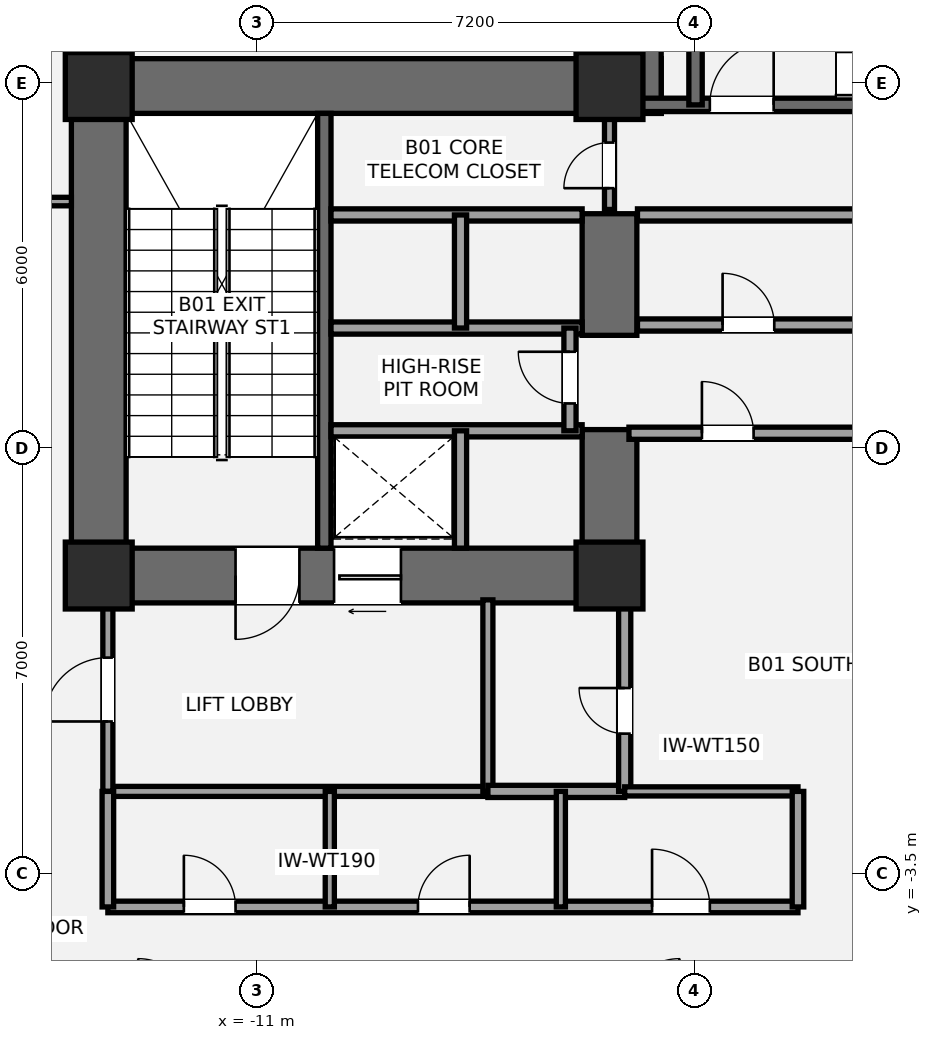
"""IFC4 building model, lengths in metres.
Left out: names, types, materials, properties, quantities, classifications, styles, units other than length and angle.
Written with IfcOpenShell. Run it as: python <this file> out.ifc"""

import sys

from ifc_helpers import new_model, si_unit, direction, frame, frame_2d, origin, origin_2d, place, context, subcontext, project, spatial, rectangle, extrude, element, fill, save


model = new_model("IFC4")
c1 = context("Model", 3, precision=1e-05, world=origin(), true_north=direction((0.0, 1.0)))
c2 = subcontext(c1, "Body", "Model", "MODEL_VIEW")
j1 = project(units=[si_unit("LENGTHUNIT", "METRE"), si_unit("PLANEANGLEUNIT", "RADIAN")], contexts=[c1])
p1 = place(None, origin())
s1 = spatial("IfcSite", under=j1, at=p1, CompositionType="ELEMENT")
p2 = place(p1, origin())
s2 = spatial("IfcBuilding", under=s1, at=p2, CompositionType="ELEMENT")
p3 = place(p2, frame((0.0, 0.0, -4.4)))
s3 = spatial("IfcBuildingStorey", under=s2, at=p3, CompositionType="ELEMENT", Elevation=-4.4)
p4 = place(p3, frame((-13.6, 0.95, 0.0), z_axis=(0.0, 0.0, 1.0), x_axis=(0.0, 1.0, 0.0)))
e1 = element("IfcWall", 1, at=p4, inside=s3, PredefinedType="SHEAR", context=c2, shape_type="SweptSolid", body=[
    extrude(rectangle(XDim=8.95, YDim=0.9, at=frame_2d((4.475, 0.0))), origin(), (0.0, 0.0, 1.0), 4.4),
])
p5 = place(p3, frame((-14.05, 9.45, 0.0), z_axis=(0.0, 0.0, 1.0), x_axis=(1.0, 0.0, 0.0)))
e2 = element("IfcWall", 2, at=p5, inside=s3, PredefinedType="SHEAR", context=c2, shape_type="SweptSolid", body=[
    extrude(rectangle(XDim=9.7, YDim=0.9, at=frame_2d((4.85, 0.0))), origin(), (0.0, 0.0, 1.0), 4.4),
])
p6 = place(p3, frame((-4.75, 1.4, 0.0), z_axis=(0.0, 0.0, 1.0), x_axis=(-1.0, 0.0, 0.0)))
e3 = element("IfcWall", 3, at=p6, inside=s3, PredefinedType="SHEAR", context=c2, shape_type="SweptSolid", body=[
    extrude(rectangle(XDim=9.3, YDim=0.9, at=frame_2d((4.65, 0.0))), origin(), (0.0, 0.0, 1.0), 4.4),
])
p7 = place(p6, frame((5.55, 0.0, 0.0)))
e4 = element("IfcOpeningElement", 4, at=p7, cuts=e3, PredefinedType="OPENING", context=c2, shape_type="SweptSolid", body=[
    extrude(rectangle(XDim=1.05, YDim=2.15, at=frame_2d((0.525, 1.075))), frame((0.0, 0.46, 0.0), z_axis=(0.0, -1.0, 0.0), x_axis=(1.0, 0.0, 0.0)), (0.0, 0.0, 1.0), 0.92),
])
p8 = place(p6, frame((3.88, 0.0, 0.0)))
e5 = element("IfcOpeningElement", 5, at=p8, cuts=e3, PredefinedType="OPENING", context=c2, shape_type="SweptSolid", body=[
    extrude(rectangle(XDim=1.1, YDim=2.2, at=frame_2d((0.55, 1.1))), frame((0.0, 0.46, 0.0), z_axis=(0.0, -1.0, 0.0), x_axis=(1.0, 0.0, 0.0)), (0.0, 0.0, 1.0), 0.92),
])
p9 = place(p3, frame((-5.2, 0.95, 0.0), z_axis=(0.0, 0.0, 1.0), x_axis=(0.0, 1.0, 0.0)))
e6 = element("IfcWall", 6, at=p9, inside=s3, PredefinedType="SHEAR", context=c2, shape_type="SweptSolid", body=[
    extrude(rectangle(XDim=2.85, YDim=0.9, at=frame_2d((1.425, 0.0))), origin(), (0.0, 0.0, 1.0), 4.4),
])
p10 = place(p3, frame((-5.2, 5.35, 0.0), z_axis=(0.0, 0.0, 1.0), x_axis=(0.0, 1.0, 0.0)))
e7 = element("IfcWall", 7, at=p10, inside=s3, PredefinedType="SHEAR", context=c2, shape_type="SweptSolid", body=[
    extrude(rectangle(XDim=2.0, YDim=0.9, at=frame_2d((1.0, 0.0))), origin(), (0.0, 0.0, 1.0), 4.4),
])
p11 = place(p3, frame((-9.89, 1.85, 0.0), z_axis=(0.0, 0.0, 1.0), x_axis=(0.0, 1.0, 0.0)))
e8 = element("IfcWall", 8, at=p11, inside=s3, PredefinedType="SHEAR", context=c2, shape_type="SweptSolid", body=[
    extrude(rectangle(XDim=7.15, YDim=0.22, at=frame_2d((3.575, 0.0))), origin(), (0.0, 0.0, 1.0), 4.4),
])
p12 = place(p3, frame((-4.8, 9.0, 0.0), z_axis=(0.0, 0.0, 1.0), x_axis=(0.0, 1.0, 0.0)))
e9 = element("IfcWall", 9, at=p12, inside=s3, PredefinedType="SHEAR", context=c2, shape_type="SweptSolid", body=[
    extrude(rectangle(XDim=4.3, YDim=0.9, at=frame_2d((2.15, 0.0))), origin(), (0.0, 0.0, 1.0), 4.4),
])
p13 = place(p3, frame((-4.7, 9.14, 0.0), z_axis=(0.0, 0.0, 1.0), x_axis=(1.0, 0.0, 0.0)))
e10 = element("IfcWall", 10, at=p13, inside=s3, PredefinedType="SHEAR", context=c2, shape_type="SweptSolid", body=[
    extrude(rectangle(XDim=9.3, YDim=0.22, at=frame_2d((4.65, 0.0))), origin(), (0.0, 0.0, 1.0), 4.4),
])
p14 = place(p13, frame((1.15, 0.0, 0.0)))
e11 = element("IfcOpeningElement", 11, at=p14, cuts=e10, PredefinedType="OPENING", context=c2, shape_type="SweptSolid", body=[
    extrude(rectangle(XDim=1.05, YDim=2.15, at=frame_2d((0.525, 1.075))), frame((0.0, 0.12, 0.0), z_axis=(0.0, -1.0, 0.0), x_axis=(1.0, 0.0, 0.0)), (0.0, 0.0, 1.0), 0.24),
])
p15 = place(p3, frame((-3.785, 9.14, 0.0), z_axis=(0.0, 0.0, 1.0), x_axis=(0.0, 1.0, 0.0)))
e12 = element("IfcWall", 12, at=p15, inside=s3, PredefinedType="SHEAR", context=c2, shape_type="SweptSolid", body=[
    extrude(rectangle(XDim=3.26, YDim=0.22, at=frame_2d((1.63, 0.0))), origin(), (0.0, 0.0, 1.0), 4.4),
])
for number, where, z_axis, x_axis in (
    (13, (-13.6, 1.4, 0.0), (0.0, 0.0, 1.0), (1.0, 0.0, 0.0)),
    (14, (-13.6, 9.45, 0.0), (0.0, 0.0, 1.0), (1.0, 0.0, 0.0)),
    (15, (-5.2, 1.4, 0.0), (0.0, 0.0, 1.0), (1.0, 0.0, 0.0)),
    (16, (-5.2, 9.45, 0.0), (0.0, 0.0, 1.0), (1.0, 0.0, 0.0)),
):
    element("IfcColumn", number, at=place(p3, frame(where, z_axis=z_axis, x_axis=x_axis)), inside=s3, PredefinedType="COLUMN", context=c2, shape_type="SweptSolid", body=[
        extrude(rectangle(XDim=1.1, YDim=1.1, at=origin_2d()), origin(), (0.0, 0.0, 1.0), 4.4),
    ])
p16 = place(p3, frame((-13.45, -2.15, 0.0), z_axis=(0.0, 0.0, 1.0), x_axis=(1.0, 0.0, 0.0)))
e17 = element("IfcWall", 17, at=p16, inside=s3, PredefinedType="PARTITIONING", context=c2, shape_type="SweptSolid", body=[
    extrude(rectangle(XDim=6.25, YDim=0.165, at=frame_2d((3.125, 0.0))), origin(), (0.0, 0.0, 1.0), 4.14),
])
p17 = place(p3, frame((-13.45, -2.15, 0.0), z_axis=(0.0, 0.0, 1.0), x_axis=(0.0, 1.0, 0.0)))
e18 = element("IfcWall", 18, at=p17, inside=s3, PredefinedType="PARTITIONING", context=c2, shape_type="SweptSolid", body=[
    extrude(rectangle(XDim=3.15, YDim=0.165, at=frame_2d((1.575, 0.0))), origin(), (0.0, 0.0, 1.0), 4.14),
])
p18 = place(p17, frame((1.15, 0.0, 0.0)))
e19 = element("IfcOpeningElement", 19, at=p18, cuts=e18, PredefinedType="OPENING", context=c2, shape_type="SweptSolid", body=[
    extrude(rectangle(XDim=1.05, YDim=2.15, at=frame_2d((0.525, 1.075))), frame((0.0, 0.093, 0.0), z_axis=(0.0, -1.0, 0.0), x_axis=(1.0, 0.0, 0.0)), (0.0, 0.0, 1.0), 0.185),
])
p19 = place(p3, frame((-7.2, -2.15, 0.0), z_axis=(0.0, 0.0, 1.0), x_axis=(0.0, 1.0, 0.0)))
e20 = element("IfcWall", 20, at=p19, inside=s3, PredefinedType="PARTITIONING", context=c2, shape_type="SweptSolid", body=[
    extrude(rectangle(XDim=3.15, YDim=0.165, at=frame_2d((1.575, 0.0))), origin(), (0.0, 0.0, 1.0), 4.14),
])
p20 = place(p3, frame((-7.2, -2.15, 0.0), z_axis=(0.0, 0.0, 1.0), x_axis=(1.0, 0.0, 0.0)))
e21 = element("IfcWall", 21, at=p20, inside=s3, PredefinedType="SOLIDWALL", context=c2, shape_type="SweptSolid", body=[
    extrude(rectangle(XDim=2.25, YDim=0.2, at=frame_2d((1.125, 0.0))), origin(), (0.0, 0.0, 1.0), 4.14),
])
p21 = place(p3, frame((-4.95, -2.15, 0.0), z_axis=(0.0, 0.0, 1.0), x_axis=(0.0, 1.0, 0.0)))
e22 = element("IfcWall", 22, at=p21, inside=s3, PredefinedType="SOLIDWALL", context=c2, shape_type="SweptSolid", body=[
    extrude(rectangle(XDim=3.15, YDim=0.2, at=frame_2d((1.575, 0.0))), origin(), (0.0, 0.0, 1.0), 3.508),
])
p22 = place(p21, frame((0.95, 0.0, 0.0)))
e23 = element("IfcOpeningElement", 23, at=p22, cuts=e22, PredefinedType="OPENING", context=c2, shape_type="SweptSolid", body=[
    extrude(rectangle(XDim=0.75, YDim=2.1, at=frame_2d((0.375, 1.05))), frame((0.0, 0.11, 0.0), z_axis=(0.0, -1.0, 0.0), x_axis=(1.0, 0.0, 0.0)), (0.0, 0.0, 1.0), 0.22),
])
p23 = place(p3, frame((-9.78, 3.78, 0.0), z_axis=(0.0, 0.0, 1.0), x_axis=(1.0, 0.0, 0.0)))
e24 = element("IfcWall", 24, at=p23, inside=s3, PredefinedType="SOLIDWALL", context=c2, shape_type="SweptSolid", body=[
    extrude(rectangle(XDim=4.13, YDim=0.2, at=frame_2d((2.065, 0.0))), origin(), (0.0, 0.0, 1.0), 4.14),
])
p24 = place(p3, frame((-7.65, 1.85, 0.0), z_axis=(0.0, 0.0, 1.0), x_axis=(0.0, 1.0, 0.0)))
e25 = element("IfcWall", 25, at=p24, inside=s3, PredefinedType="SOLIDWALL", context=c2, shape_type="SweptSolid", body=[
    extrude(rectangle(XDim=1.93, YDim=0.2, at=frame_2d((0.965, 0.0))), origin(), (0.0, 0.0, 1.0), 4.14),
])
for number, where, z_axis, x_axis in (
    (26, (-9.78, 5.47, 0.0), (0.0, 0.0, 1.0), (1.0, 0.0, 0.0)),
    (27, (-9.78, 7.33, 0.0), (0.0, 0.0, 1.0), (1.0, 0.0, 0.0)),
):
    element("IfcWall", number, at=place(p3, frame(where, z_axis=z_axis, x_axis=x_axis)), inside=s3, PredefinedType="SOLIDWALL", context=c2, shape_type="SweptSolid", body=[
        extrude(rectangle(XDim=4.13, YDim=0.2, at=frame_2d((2.065, 0.0))), origin(), (0.0, 0.0, 1.0), 4.14),
    ])
p25 = place(p3, frame((-7.65, 5.47, 0.0), z_axis=(0.0, 0.0, 1.0), x_axis=(0.0, 1.0, 0.0)))
e28 = element("IfcWall", 28, at=p25, inside=s3, PredefinedType="SOLIDWALL", context=c2, shape_type="SweptSolid", body=[
    extrude(rectangle(XDim=1.86, YDim=0.2, at=frame_2d((0.93, 0.0))), origin(), (0.0, 0.0, 1.0), 4.14),
])
p26 = place(p3, frame((-5.85, 3.78, 0.0), z_axis=(0.0, 0.0, 1.0), x_axis=(0.0, 1.0, 0.0)))
e29 = element("IfcWall", 29, at=p26, inside=s3, PredefinedType="SOLIDWALL", context=c2, shape_type="SweptSolid", body=[
    extrude(rectangle(XDim=1.69, YDim=0.2, at=frame_2d((0.845, 0.0))), origin(), (0.0, 0.0, 1.0), 4.14),
])
p27 = place(p26, frame((0.45, 0.0, 0.0)))
e30 = element("IfcOpeningElement", 30, at=p27, cuts=e29, PredefinedType="OPENING", context=c2, shape_type="SweptSolid", body=[
    extrude(rectangle(XDim=0.85, YDim=2.1, at=frame_2d((0.425, 1.05))), frame((0.0, 0.11, 0.0), z_axis=(0.0, -1.0, 0.0), x_axis=(1.0, 0.0, 0.0)), (0.0, 0.0, 1.0), 0.22),
])
p28 = place(p3, frame((-4.88, 3.74, 0.0), z_axis=(0.0, 0.0, 1.0), x_axis=(1.0, 0.0, 0.0)))
e31 = element("IfcWall", 31, at=p28, inside=s3, PredefinedType="SOLIDWALL", context=c2, shape_type="SweptSolid", body=[
    extrude(rectangle(XDim=4.0, YDim=0.2, at=frame_2d((2.0, 0.0))), origin(), (0.0, 0.0, 1.0), 4.14),
])
p29 = place(p28, frame((1.2, 0.0, 0.0)))
e32 = element("IfcOpeningElement", 32, at=p29, cuts=e31, PredefinedType="OPENING", context=c2, shape_type="SweptSolid", body=[
    extrude(rectangle(XDim=0.85, YDim=2.1, at=frame_2d((0.425, 1.05))), frame((0.0, 0.11, 0.0), z_axis=(0.0, -1.0, 0.0), x_axis=(1.0, 0.0, 0.0)), (0.0, 0.0, 1.0), 0.22),
])
p30 = place(p3, frame((-4.74, 5.52, 0.0), z_axis=(0.0, 0.0, 1.0), x_axis=(1.0, 0.0, 0.0)))
e33 = element("IfcWall", 33, at=p30, inside=s3, PredefinedType="SOLIDWALL", context=c2, shape_type="SweptSolid", body=[
    extrude(rectangle(XDim=3.86, YDim=0.2, at=frame_2d((1.93, 0.0))), origin(), (0.0, 0.0, 1.0), 4.14),
])
p31 = place(p30, frame((1.4, 0.0, 0.0)))
e34 = element("IfcOpeningElement", 34, at=p31, cuts=e33, PredefinedType="OPENING", context=c2, shape_type="SweptSolid", body=[
    extrude(rectangle(XDim=0.85, YDim=2.1, at=frame_2d((0.425, 1.05))), frame((0.0, 0.11, 0.0), z_axis=(0.0, -1.0, 0.0), x_axis=(1.0, 0.0, 0.0)), (0.0, 0.0, 1.0), 0.22),
])
p32 = place(p3, frame((-4.74, 7.33, 0.0), z_axis=(0.0, 0.0, 1.0), x_axis=(1.0, 0.0, 0.0)))
e35 = element("IfcWall", 35, at=p32, inside=s3, PredefinedType="SOLIDWALL", context=c2, shape_type="SweptSolid", body=[
    extrude(rectangle(XDim=3.86, YDim=0.2, at=frame_2d((1.93, 0.0))), origin(), (0.0, 0.0, 1.0), 4.14),
])
p33 = place(p3, frame((-5.2, 7.42, 0.0), z_axis=(0.0, 0.0, 1.0), x_axis=(0.0, 1.0, 0.0)))
e36 = element("IfcWall", 36, at=p33, inside=s3, PredefinedType="PARTITIONING", context=c2, shape_type="SweptSolid", body=[
    extrude(rectangle(XDim=1.58, YDim=0.165, at=frame_2d((0.79, 0.0))), origin(), (0.0, 0.0, 1.0), 4.14),
])
p34 = place(p33, frame((0.35, 0.0, 0.0)))
e37 = element("IfcOpeningElement", 37, at=p34, cuts=e36, PredefinedType="OPENING", context=c2, shape_type="SweptSolid", body=[
    extrude(rectangle(XDim=0.75, YDim=2.1, at=frame_2d((0.375, 1.05))), frame((0.0, 0.093, 0.0), z_axis=(0.0, -1.0, 0.0), x_axis=(1.0, 0.0, 0.0)), (0.0, 0.0, 1.0), 0.185),
])
p35 = place(p3, frame((-13.45, -4.05, 0.0), z_axis=(0.0, 0.0, 1.0), x_axis=(1.0, 0.0, 0.0)))
e38 = element("IfcWall", 38, at=p35, inside=s3, PredefinedType="PLUMBINGWALL", context=c2, shape_type="SweptSolid", body=[
    extrude(rectangle(XDim=11.35, YDim=0.19, at=frame_2d((5.675, 0.0))), origin(), (0.0, 0.0, 1.0), 3.667),
])
p36 = place(p35, frame((1.25, 0.0, 0.0)))
e39 = element("IfcOpeningElement", 39, at=p36, cuts=e38, PredefinedType="OPENING", context=c2, shape_type="SweptSolid", body=[
    extrude(rectangle(XDim=0.85, YDim=2.1, at=frame_2d((0.425, 1.05))), frame((0.0, 0.105, 0.0), z_axis=(0.0, -1.0, 0.0), x_axis=(1.0, 0.0, 0.0)), (0.0, 0.0, 1.0), 0.21),
])
p37 = place(p35, frame((5.1, 0.0, 0.0)))
e40 = element("IfcOpeningElement", 40, at=p37, cuts=e38, PredefinedType="OPENING", context=c2, shape_type="SweptSolid", body=[
    extrude(rectangle(XDim=0.85, YDim=2.1, at=frame_2d((0.425, 1.05))), frame((0.0, 0.105, 0.0), z_axis=(0.0, -1.0, 0.0), x_axis=(1.0, 0.0, 0.0)), (0.0, 0.0, 1.0), 0.21),
])
p38 = place(p35, frame((8.95, 0.0, 0.0)))
e41 = element("IfcOpeningElement", 41, at=p38, cuts=e38, PredefinedType="OPENING", context=c2, shape_type="SweptSolid", body=[
    extrude(rectangle(XDim=0.95, YDim=2.15, at=frame_2d((0.475, 1.075))), frame((0.0, 0.105, 0.0), z_axis=(0.0, -1.0, 0.0), x_axis=(1.0, 0.0, 0.0)), (0.0, 0.0, 1.0), 0.21),
])
p39 = place(p3, frame((-4.95, -2.15, 0.0), z_axis=(0.0, 0.0, 1.0), x_axis=(1.0, 0.0, 0.0)))
e42 = element("IfcWall", 42, at=p39, inside=s3, PredefinedType="PLUMBINGWALL", context=c2, shape_type="SweptSolid", body=[
    extrude(rectangle(XDim=2.85, YDim=0.15, at=frame_2d((1.425, 0.0))), origin(), (0.0, 0.0, 1.0), 4.14),
])
for number, where, z_axis, x_axis in (
    (43, (-13.45, -4.05, 0.0), (0.0, 0.0, 1.0), (0.0, 1.0, 0.0)),
    (44, (-2.1, -4.05, 0.0), (0.0, 0.0, 1.0), (0.0, 1.0, 0.0)),
):
    element("IfcWall", number, at=place(p3, frame(where, z_axis=z_axis, x_axis=x_axis)), inside=s3, PredefinedType="PLUMBINGWALL", context=c2, shape_type="SweptSolid", body=[
        extrude(rectangle(XDim=1.9, YDim=0.19, at=frame_2d((0.95, 0.0))), origin(), (0.0, 0.0, 1.0), 4.14),
    ])
p40 = place(p3, frame((-9.8, -4.05, 0.0), z_axis=(0.0, 0.0, 1.0), x_axis=(0.0, 1.0, 0.0)))
e45 = element("IfcWall", 45, at=p40, inside=s3, PredefinedType="PLUMBINGWALL", context=c2, shape_type="SweptSolid", body=[
    extrude(rectangle(XDim=1.9, YDim=0.15, at=frame_2d((0.95, 0.0))), origin(), (0.0, 0.0, 1.0), 4.14),
])
p41 = place(p3, frame((-6.0, -4.05, 0.0), z_axis=(0.0, 0.0, 1.0), x_axis=(0.0, 1.0, 0.0)))
e46 = element("IfcWall", 46, at=p41, inside=s3, PredefinedType="PLUMBINGWALL", context=c2, shape_type="SweptSolid", body=[
    extrude(rectangle(XDim=1.9, YDim=0.15, at=frame_2d((0.95, 0.0))), origin(), (0.0, 0.0, 1.0), 3.508),
])
p42 = place(p3, frame((-16.0, 7.55, 0.0), z_axis=(0.0, 0.0, 1.0), x_axis=(1.0, 0.0, 0.0)))
e47 = element("IfcWall", 47, at=p42, inside=s3, PredefinedType="PARTITIONING", context=c2, shape_type="SweptSolid", body=[
    extrude(rectangle(XDim=1.95, YDim=0.14, at=frame_2d((0.975, 0.0))), origin(), (0.0, 0.0, 1.0), 4.14),
])
p43 = place(p42, frame((0.32, 0.0, 0.0)))
e48 = element("IfcOpeningElement", 48, at=p43, cuts=e47, PredefinedType="OPENING", context=c2, shape_type="SweptSolid", body=[
    extrude(rectangle(XDim=0.92, YDim=2.15, at=frame_2d((0.46, 1.075))), frame((0.0, 0.08, 0.0), z_axis=(0.0, -1.0, 0.0), x_axis=(1.0, 0.0, 0.0)), (0.0, 0.0, 1.0), 0.16),
])
p44 = place(p7, origin())
e49 = element("IfcDoor", 49, at=p44, inside=s3, OperationType="SINGLE_SWING_RIGHT", PredefinedType="DOOR", context=c2, shape_type="SweptSolid", body=[
    extrude(rectangle(XDim=1.05, YDim=2.15, at=frame_2d((0.525, 1.075))), frame((0.0, 0.025, 0.0), z_axis=(0.0, -1.0, 0.0), x_axis=(1.0, 0.0, 0.0)), (0.0, 0.0, 1.0), 0.05),
])
fill(e4, e49)
p45 = place(p14, origin())
e50 = element("IfcDoor", 50, at=p45, inside=s3, OperationType="SINGLE_SWING_RIGHT", PredefinedType="DOOR", context=c2, shape_type="SweptSolid", body=[
    extrude(rectangle(XDim=1.05, YDim=2.15, at=frame_2d((0.525, 1.075))), frame((0.0, 0.025, 0.0), z_axis=(0.0, -1.0, 0.0), x_axis=(1.0, 0.0, 0.0)), (0.0, 0.0, 1.0), 0.05),
])
fill(e11, e50)
p46 = place(p18, origin())
e51 = element("IfcDoor", 51, at=p46, inside=s3, OperationType="SINGLE_SWING_LEFT", PredefinedType="DOOR", context=c2, shape_type="SweptSolid", body=[
    extrude(rectangle(XDim=1.05, YDim=2.15, at=frame_2d((0.525, 1.075))), frame((0.0, 0.025, 0.0), z_axis=(0.0, -1.0, 0.0), x_axis=(1.0, 0.0, 0.0)), (0.0, 0.0, 1.0), 0.05),
])
fill(e19, e51)
p47 = place(p22, origin())
e52 = element("IfcDoor", 52, at=p47, inside=s3, OperationType="SINGLE_SWING_RIGHT", PredefinedType="DOOR", context=c2, shape_type="SweptSolid", body=[
    extrude(rectangle(XDim=0.75, YDim=2.1, at=frame_2d((0.375, 1.05))), frame((0.0, 0.025, 0.0), z_axis=(0.0, -1.0, 0.0), x_axis=(1.0, 0.0, 0.0)), (0.0, 0.0, 1.0), 0.05),
])
fill(e23, e52)
p48 = place(p8, origin())
e53 = element("IfcDoor", 53, at=p48, inside=s3, OperationType="SLIDING_TO_LEFT", PredefinedType="DOOR", context=c2, shape_type="SweptSolid", body=[
    extrude(rectangle(XDim=1.1, YDim=2.2, at=frame_2d((0.55, 1.1))), frame((0.0, 0.025, 0.0), z_axis=(0.0, -1.0, 0.0), x_axis=(1.0, 0.0, 0.0)), (0.0, 0.0, 1.0), 0.05),
])
fill(e5, e53)
p49 = place(p27, origin())
e54 = element("IfcDoor", 54, at=p49, inside=s3, OperationType="SINGLE_SWING_RIGHT", PredefinedType="DOOR", context=c2, shape_type="SweptSolid", body=[
    extrude(rectangle(XDim=0.85, YDim=2.1, at=frame_2d((0.425, 1.05))), frame((0.0, 0.025, 0.0), z_axis=(0.0, -1.0, 0.0), x_axis=(1.0, 0.0, 0.0)), (0.0, 0.0, 1.0), 0.05),
])
fill(e30, e54)
p50 = place(p29, origin())
e55 = element("IfcDoor", 55, at=p50, inside=s3, OperationType="SINGLE_SWING_LEFT", PredefinedType="DOOR", context=c2, shape_type="SweptSolid", body=[
    extrude(rectangle(XDim=0.85, YDim=2.1, at=frame_2d((0.425, 1.05))), frame((0.0, 0.025, 0.0), z_axis=(0.0, -1.0, 0.0), x_axis=(1.0, 0.0, 0.0)), (0.0, 0.0, 1.0), 0.05),
])
fill(e32, e55)
p51 = place(p31, origin())
e56 = element("IfcDoor", 56, at=p51, inside=s3, OperationType="SINGLE_SWING_LEFT", PredefinedType="DOOR", context=c2, shape_type="SweptSolid", body=[
    extrude(rectangle(XDim=0.85, YDim=2.1, at=frame_2d((0.425, 1.05))), frame((0.0, 0.025, 0.0), z_axis=(0.0, -1.0, 0.0), x_axis=(1.0, 0.0, 0.0)), (0.0, 0.0, 1.0), 0.05),
])
fill(e34, e56)
p52 = place(p34, origin())
e57 = element("IfcDoor", 57, at=p52, inside=s3, OperationType="SINGLE_SWING_LEFT", PredefinedType="DOOR", context=c2, shape_type="SweptSolid", body=[
    extrude(rectangle(XDim=0.75, YDim=2.1, at=frame_2d((0.375, 1.05))), frame((0.0, 0.025, 0.0), z_axis=(0.0, -1.0, 0.0), x_axis=(1.0, 0.0, 0.0)), (0.0, 0.0, 1.0), 0.05),
])
fill(e37, e57)
p53 = place(p36, origin())
e58 = element("IfcDoor", 58, at=p53, inside=s3, OperationType="SINGLE_SWING_LEFT", PredefinedType="DOOR", context=c2, shape_type="SweptSolid", body=[
    extrude(rectangle(XDim=0.85, YDim=2.1, at=frame_2d((0.425, 1.05))), frame((0.0, 0.025, 0.0), z_axis=(0.0, -1.0, 0.0), x_axis=(1.0, 0.0, 0.0)), (0.0, 0.0, 1.0), 0.05),
])
fill(e39, e58)
p54 = place(p37, origin())
e59 = element("IfcDoor", 59, at=p54, inside=s3, OperationType="SINGLE_SWING_RIGHT", PredefinedType="DOOR", context=c2, shape_type="SweptSolid", body=[
    extrude(rectangle(XDim=0.85, YDim=2.1, at=frame_2d((0.425, 1.05))), frame((0.0, 0.025, 0.0), z_axis=(0.0, -1.0, 0.0), x_axis=(1.0, 0.0, 0.0)), (0.0, 0.0, 1.0), 0.05),
])
fill(e40, e59)
p55 = place(p38, origin())
e60 = element("IfcDoor", 60, at=p55, inside=s3, OperationType="SINGLE_SWING_LEFT", PredefinedType="DOOR", context=c2, shape_type="SweptSolid", body=[
    extrude(rectangle(XDim=0.95, YDim=2.15, at=frame_2d((0.475, 1.075))), frame((0.0, 0.025, 0.0), z_axis=(0.0, -1.0, 0.0), x_axis=(1.0, 0.0, 0.0)), (0.0, 0.0, 1.0), 0.05),
])
fill(e41, e60)
save(model, sys.argv[1])
